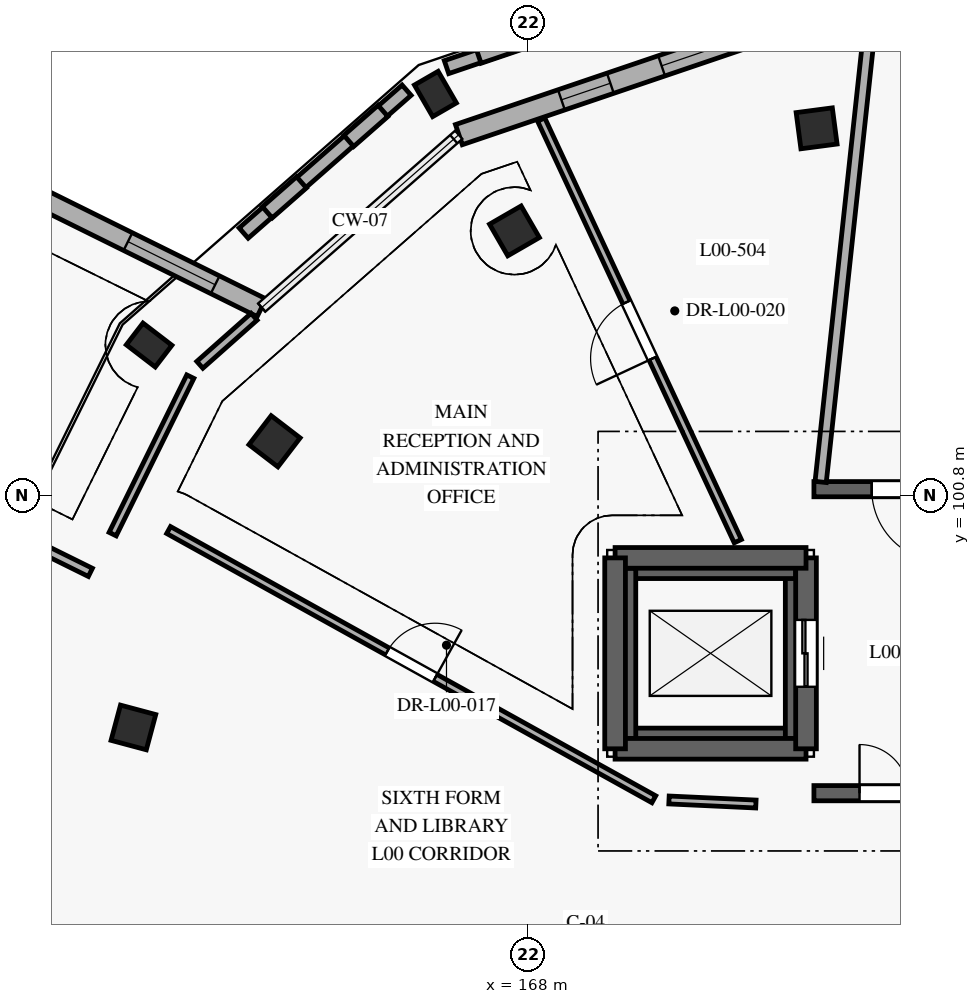
"""IFC4 building model, lengths in metres.
Left out: names, types, materials, properties, quantities, classifications, styles, units other than length and angle.
Written with IfcOpenShell. Run it as: python <this file> out.ifc"""

import sys

from ifc_helpers import new_model, si_unit, direction, frame, frame_2d, origin, origin_2d, place, context, subcontext, project, spatial, rectangle, extrude, element, fill, save


model = new_model("IFC4")
c1 = context("Model", 3, precision=1e-05, world=origin(), true_north=direction((0.0, 1.0)))
c2 = subcontext(c1, "Body", "Model", "MODEL_VIEW")
j1 = project(units=[si_unit("LENGTHUNIT", "METRE"), si_unit("PLANEANGLEUNIT", "RADIAN")], contexts=[c1])
p1 = place(None, origin())
s1 = spatial("IfcSite", under=j1, at=p1, CompositionType="ELEMENT")
p2 = place(p1, origin())
s2 = spatial("IfcBuilding", under=s1, at=p2, CompositionType="ELEMENT")
p3 = place(p2, origin())
s3 = spatial("IfcBuildingStorey", under=s2, at=p3, CompositionType="ELEMENT", Elevation=0.0)
for number, where, z_axis, x_axis in (
    (1, (166.475, 107.4, 0.0), (0.0, 0.0, 1.0), (-0.866, -0.5, 0.0)),
    (2, (161.767, 103.271, 0.0), (0.0, 0.0, 1.0), (-0.609, -0.793, 0.0)),
):
    element("IfcColumn", number, at=place(p3, frame(where, z_axis=z_axis, x_axis=x_axis)), inside=s3, PredefinedType="PILASTER", context=c2, shape_type="SweptSolid", body=[
        extrude(rectangle(XDim=0.45, YDim=0.6, at=origin_2d()), origin(), (0.0, 0.0, 1.0), 4.2),
    ])
for number, where, z_axis, x_axis in (
    (3, (172.744, 106.835, 0.0), (0.0, 0.0, 1.0), (-0.991, -0.131, 0.0)),
    (4, (167.775, 105.148, 0.0), (0.0, 0.0, 1.0), (-0.866, -0.5, 0.0)),
    (5, (163.829, 101.688, 0.0), (0.0, 0.0, 1.0), (-0.609, -0.793, 0.0)),
    (6, (161.508, 96.981, 0.0), (0.0, 0.0, 1.0), (-0.259, -0.966, 0.0)),
):
    element("IfcColumn", number, at=place(p3, frame(where, z_axis=z_axis, x_axis=x_axis)), inside=s3, PredefinedType="COLUMN", context=c2, shape_type="SweptSolid", body=[
        extrude(rectangle(XDim=0.6, YDim=0.6, at=origin_2d()), origin(), (0.0, 0.0, 1.0), 4.2),
    ])
p4 = place(p3, frame((157.696, 106.814, 0.0), z_axis=(0.0, 0.0, 1.0), x_axis=(0.896260258603, -0.443528520897, 0.0)))
e7 = element("IfcWall", 7, at=p4, inside=s3, PredefinedType="SOLIDWALL", context=c2, shape_type="SweptSolid", body=[
    extrude(rectangle(XDim=6.605, YDim=0.325, at=frame_2d((3.303, 0.0))), origin(), (0.0, 0.0, 1.0), 3.94),
])
p5 = place(p4, frame((0.927, 0.0, 0.85)))
e8 = element("IfcOpeningElement", 8, at=p5, cuts=e7, PredefinedType="OPENING", context=c2, shape_type="SweptSolid", body=[
    extrude(rectangle(XDim=1.45, YDim=1.8, at=frame_2d((0.725, 0.9))), frame((0.0, 0.172, 0.0), z_axis=(0.0, -1.0, 0.0), x_axis=(1.0, 0.0, 0.0)), (0.0, 0.0, 1.0), 0.345),
])
p6 = place(p4, frame((4.154, 0.0, 0.85)))
e9 = element("IfcOpeningElement", 9, at=p6, cuts=e7, PredefinedType="OPENING", context=c2, shape_type="SweptSolid", body=[
    extrude(rectangle(XDim=1.6, YDim=1.8, at=frame_2d((0.8, 0.9))), frame((0.0, 0.172, 0.0), z_axis=(0.0, -1.0, 0.0), x_axis=(1.0, 0.0, 0.0)), (0.0, 0.0, 1.0), 0.345),
])
p7 = place(p3, frame((166.861, 106.731, 0.0), z_axis=(0.0, 0.0, 1.0), x_axis=(0.94693663561, 0.321420298269, 0.0)))
e10 = element("IfcWall", 10, at=p7, inside=s3, PredefinedType="SOLIDWALL", context=c2, shape_type="SweptSolid", body=[
    extrude(rectangle(XDim=5.961, YDim=0.35, at=frame_2d((2.98, 0.0))), origin(), (0.0, 0.0, 1.0), 3.94),
])
p8 = place(p7, frame((1.781, 0.0, 0.85)))
e11 = element("IfcOpeningElement", 11, at=p8, cuts=e10, PredefinedType="OPENING", context=c2, shape_type="SweptSolid", body=[
    extrude(rectangle(XDim=0.85, YDim=1.4, at=frame_2d((0.425, 0.7))), frame((0.0, 0.185, 0.0), z_axis=(0.0, -1.0, 0.0), x_axis=(1.0, 0.0, 0.0)), (0.0, 0.0, 1.0), 0.37),
])
p9 = place(p7, frame((3.521, 0.0, 0.85)))
e12 = element("IfcOpeningElement", 12, at=p9, cuts=e10, PredefinedType="OPENING", context=c2, shape_type="SweptSolid", body=[
    extrude(rectangle(XDim=1.9, YDim=1.8, at=frame_2d((0.95, 0.9))), frame((0.0, 0.185, 0.0), z_axis=(0.0, -1.0, 0.0), x_axis=(1.0, 0.0, 0.0)), (0.0, 0.0, 1.0), 0.37),
])
p10 = place(p3, frame((172.506, 108.647, 0.0), z_axis=(0.0, 0.0, 1.0), x_axis=(0.997858658418, -0.065407169492, 0.0)))
e13 = element("IfcWall", 13, at=p10, inside=s3, PredefinedType="SOLIDWALL", context=c2, shape_type="SweptSolid", body=[
    extrude(rectangle(XDim=5.961, YDim=0.38, at=frame_2d((2.98, 0.0))), origin(), (0.0, 0.0, 1.0), 3.94),
])
p11 = place(p10, frame((1.98, 0.0, 0.0)))
e14 = element("IfcOpeningElement", 14, at=p11, cuts=e13, PredefinedType="OPENING", context=c2, shape_type="SweptSolid", body=[
    extrude(rectangle(XDim=2.0, YDim=2.2, at=frame_2d((1.0, 1.1))), frame((0.0, 0.2, 0.0), z_axis=(0.0, -1.0, 0.0), x_axis=(1.0, 0.0, 0.0)), (0.0, 0.0, 1.0), 0.4),
])
p12 = place(p3, frame((171.991, 109.652, 0.0), z_axis=(0.0, 0.0, 1.0), x_axis=(-0.946926405411, -0.321450435893, 0.0)))
e15 = element("IfcWall", 15, at=p12, inside=s3, PredefinedType="ELEMENTEDWALL", context=c2, shape_type="SweptSolid", body=[
    extrude(rectangle(XDim=5.632, YDim=0.225, at=frame_2d((2.816, 0.0))), origin(), (0.0, 0.0, 1.0), 0.55),
])
p13 = place(p3, frame((167.906, 108.265, 0.55), z_axis=(0.0, 0.0, 1.0), x_axis=(-0.946868666253, -0.321620473335, 0.0)))
e16 = element("IfcWall", 16, at=p13, inside=s3, PredefinedType="ELEMENTEDWALL", context=c2, shape_type="SweptSolid", body=[
    extrude(rectangle(XDim=0.76, YDim=0.245, at=frame_2d((0.38, 0.0))), origin(), (0.0, 0.0, 1.0), 3.39),
])
p14 = place(p3, frame((166.001, 107.462, 0.0), z_axis=(0.0, 0.0, 1.0), x_axis=(-0.751829405296, -0.659357676328, 0.0)))
e17 = element("IfcWall", 17, at=p14, inside=s3, PredefinedType="ELEMENTEDWALL", context=c2, shape_type="SweptSolid", body=[
    extrude(rectangle(XDim=3.564, YDim=0.225, at=frame_2d((1.782, 0.0))), origin(), (0.0, 0.0, 1.0), 0.55),
])
p15 = place(p3, frame((165.613, 107.122, 0.55), z_axis=(0.0, 0.0, 1.0), x_axis=(-0.751787503055, -0.659405452093, 0.0)))
e18 = element("IfcWall", 18, at=p15, inside=s3, PredefinedType="ELEMENTEDWALL", context=c2, shape_type="SweptSolid", body=[
    extrude(rectangle(XDim=0.748, YDim=0.245, at=frame_2d((0.374, 0.0))), origin(), (0.0, 0.0, 1.0), 3.39),
])
p16 = place(p3, frame((164.273, 105.946, 0.55), z_axis=(0.0, 0.0, 1.0), x_axis=(-0.751929391285, -0.659243650346, 0.0)))
e19 = element("IfcWall", 19, at=p16, inside=s3, PredefinedType="ELEMENTEDWALL", context=c2, shape_type="SweptSolid", body=[
    extrude(rectangle(XDim=0.748, YDim=0.245, at=frame_2d((0.374, 0.0))), origin(), (0.0, 0.0, 1.0), 3.39),
])
p17 = place(p3, frame((169.6, 96.8, -1.4), z_axis=(0.0, 0.0, 1.0), x_axis=(1.0, 0.0, 0.0)))
e20 = element("IfcWall", 20, at=p17, inside=s3, PredefinedType="SHEAR", context=c2, shape_type="SweptSolid", body=[
    extrude(rectangle(XDim=2.8, YDim=0.34, at=frame_2d((1.4, 0.0))), origin(), (0.0, 0.0, 1.0), 1.4),
])
p18 = place(p3, frame((172.4, 96.8, -1.4), z_axis=(0.0, 0.0, 1.0), x_axis=(0.0, 1.0, 0.0)))
e21 = element("IfcWall", 21, at=p18, inside=s3, PredefinedType="SHEAR", context=c2, shape_type="SweptSolid", body=[
    extrude(rectangle(XDim=2.8, YDim=0.34, at=frame_2d((1.4, 0.0))), origin(), (0.0, 0.0, 1.0), 1.4),
])
p19 = place(p3, frame((172.4, 99.6, -1.4), z_axis=(0.0, 0.0, 1.0), x_axis=(-1.0, 0.0, 0.0)))
e22 = element("IfcWall", 22, at=p19, inside=s3, PredefinedType="SHEAR", context=c2, shape_type="SweptSolid", body=[
    extrude(rectangle(XDim=2.8, YDim=0.34, at=frame_2d((1.4, 0.0))), origin(), (0.0, 0.0, 1.0), 1.4),
])
p20 = place(p3, frame((169.6, 99.6, -1.4), z_axis=(0.0, 0.0, 1.0), x_axis=(0.0, -1.0, 0.0)))
e23 = element("IfcWall", 23, at=p20, inside=s3, PredefinedType="SHEAR", context=c2, shape_type="SweptSolid", body=[
    extrude(rectangle(XDim=2.8, YDim=0.34, at=frame_2d((1.4, 0.0))), origin(), (0.0, 0.0, 1.0), 1.4),
])
p21 = place(p3, frame((169.43, 96.63, 0.0), z_axis=(0.0, 0.0, 1.0), x_axis=(1.0, 0.0, 0.0)))
e24 = element("IfcWall", 24, at=p21, inside=s3, PredefinedType="SHEAR", context=c2, shape_type="SweptSolid", body=[
    extrude(rectangle(XDim=3.14, YDim=0.34, at=frame_2d((1.57, 0.0))), origin(), (0.0, 0.0, 1.0), 3.95),
])
p22 = place(p3, frame((172.57, 96.63, 0.0), z_axis=(0.0, 0.0, 1.0), x_axis=(0.0, 1.0, 0.0)))
e25 = element("IfcWall", 25, at=p22, inside=s3, PredefinedType="SHEAR", context=c2, shape_type="SweptSolid", body=[
    extrude(rectangle(XDim=3.14, YDim=0.34, at=frame_2d((1.57, 0.0))), origin(), (0.0, 0.0, 1.0), 3.95),
])
p23 = place(p22, frame((1.02, 0.0, 0.0)))
e26 = element("IfcOpeningElement", 26, at=p23, cuts=e25, PredefinedType="OPENING", context=c2, shape_type="SweptSolid", body=[
    extrude(rectangle(XDim=1.1, YDim=2.1, at=frame_2d((0.55, 1.05))), frame((0.0, 0.18, 0.0), z_axis=(0.0, -1.0, 0.0), x_axis=(1.0, 0.0, 0.0)), (0.0, 0.0, 1.0), 0.36),
])
for number, where, z_axis, x_axis in (
    (27, (172.57, 99.77, 0.0), (0.0, 0.0, 1.0), (-1.0, 0.0, 0.0)),
    (28, (169.43, 99.77, 0.0), (0.0, 0.0, 1.0), (0.0, -1.0, 0.0)),
):
    element("IfcWall", number, at=place(p3, frame(where, z_axis=z_axis, x_axis=x_axis)), inside=s3, PredefinedType="SHEAR", context=c2, shape_type="SweptSolid", body=[
        extrude(rectangle(XDim=3.14, YDim=0.34, at=frame_2d((1.57, 0.0))), origin(), (0.0, 0.0, 1.0), 3.95),
    ])
p24 = place(p3, frame((172.7, 95.9, 0.0), z_axis=(0.0, 0.0, 1.0), x_axis=(1.0, 0.0, 0.0)))
e29 = element("IfcWall", 29, at=p24, inside=s3, PredefinedType="SHEAR", context=c2, shape_type="SweptSolid", body=[
    extrude(rectangle(XDim=3.1, YDim=0.25, at=frame_2d((1.55, 0.0))), origin(), (0.0, 0.0, 1.0), 3.95),
])
p25 = place(p24, frame((0.75, 0.0, 0.0)))
e30 = element("IfcOpeningElement", 30, at=p25, cuts=e29, PredefinedType="OPENING", context=c2, shape_type="SweptSolid", body=[
    extrude(rectangle(XDim=1.6, YDim=2.15, at=frame_2d((0.8, 1.075))), frame((0.0, 0.135, 0.0), z_axis=(0.0, -1.0, 0.0), x_axis=(1.0, 0.0, 0.0)), (0.0, 0.0, 1.0), 0.27),
])
p26 = place(p3, frame((175.8, 100.9, 0.0), z_axis=(0.0, 0.0, 1.0), x_axis=(-1.0, 0.0, 0.0)))
e31 = element("IfcWall", 31, at=p26, inside=s3, PredefinedType="SHEAR", context=c2, shape_type="SweptSolid", body=[
    extrude(rectangle(XDim=3.1, YDim=0.25, at=frame_2d((1.55, 0.0))), origin(), (0.0, 0.0, 1.0), 3.95),
])
p27 = place(p26, frame((0.95, 0.0, 0.0)))
e32 = element("IfcOpeningElement", 32, at=p27, cuts=e31, PredefinedType="OPENING", context=c2, shape_type="SweptSolid", body=[
    extrude(rectangle(XDim=1.2, YDim=2.1, at=frame_2d((0.6, 1.05))), frame((0.0, 0.135, 0.0), z_axis=(0.0, -1.0, 0.0), x_axis=(1.0, 0.0, 0.0)), (0.0, 0.0, 1.0), 0.27),
])
p28 = place(p3, frame((173.605, 108.386, 0.0), z_axis=(0.0, 0.0, 1.0), x_axis=(-0.107241554815, -0.994232995289, 0.0)))
e33 = element("IfcWall", 33, at=p28, inside=s3, PredefinedType="PARTITIONING", context=c2, shape_type="SweptSolid", body=[
    extrude(rectangle(XDim=7.41, YDim=0.185, at=frame_2d((3.705, 0.0))), origin(), (0.0, 0.0, 1.0), 3.915),
])
p29 = place(p3, frame((171.448, 100.045, 0.0), z_axis=(0.0, 0.0, 1.0), x_axis=(-0.422616424188, 0.906308643899, 0.0)))
e34 = element("IfcWall", 34, at=p29, inside=s3, PredefinedType="PARTITIONING", context=c2, shape_type="SweptSolid", body=[
    extrude(rectangle(XDim=7.651, YDim=0.13, at=frame_2d((3.825, 0.0))), origin(), (0.0, 0.0, 1.0), 3.915),
])
p30 = place(p29, frame((3.315, 0.0, 0.0)))
e35 = element("IfcOpeningElement", 35, at=p30, cuts=e34, PredefinedType="OPENING", context=c2, shape_type="SweptSolid", body=[
    extrude(rectangle(XDim=1.02, YDim=2.06, at=frame_2d((0.51, 1.03))), frame((0.0, 0.075, 0.0), z_axis=(0.0, -1.0, 0.0), x_axis=(1.0, 0.0, 0.0)), (0.0, 0.0, 1.0), 0.15),
])
p31 = place(p3, frame((162.444, 102.751, 0.0), z_axis=(0.0, 0.0, 1.0), x_axis=(-0.442302732692, -0.896865816415, 0.0)))
e36 = element("IfcWall", 36, at=p31, inside=s3, PredefinedType="PARTITIONING", context=c2, shape_type="SweptSolid", body=[
    extrude(rectangle(XDim=2.887, YDim=0.13, at=frame_2d((1.444, 0.0))), origin(), (0.0, 0.0, 1.0), 3.915),
])
p32 = place(p3, frame((162.087, 100.228, 0.0), z_axis=(0.0, 0.0, 1.0), x_axis=(0.874404504476, -0.485197653077, 0.0)))
e37 = element("IfcWall", 37, at=p32, inside=s3, PredefinedType="PARTITIONING", context=c2, shape_type="SweptSolid", body=[
    extrude(rectangle(XDim=9.126, YDim=0.13, at=frame_2d((4.563, 0.0))), origin(), (0.0, 0.0, 1.0), 3.915),
])
p33 = place(p32, frame((4.113, 0.0, 0.0)))
e38 = element("IfcOpeningElement", 38, at=p33, cuts=e37, PredefinedType="OPENING", context=c2, shape_type="SweptSolid", body=[
    extrude(rectangle(XDim=0.9, YDim=2.05, at=frame_2d((0.45, 1.025))), frame((0.0, 0.075, 0.0), z_axis=(0.0, -1.0, 0.0), x_axis=(1.0, 0.0, 0.0)), (0.0, 0.0, 1.0), 0.15),
])
p34 = place(p3, frame((170.316, 95.788, 0.0), z_axis=(0.0, 0.0, 1.0), x_axis=(0.998914369118, -0.046584151481, 0.0)))
e39 = element("IfcWall", 39, at=p34, inside=s3, PredefinedType="PARTITIONING", context=c2, shape_type="SweptSolid", body=[
    extrude(rectangle(XDim=1.431, YDim=0.13, at=frame_2d((0.715, 0.0))), origin(), (0.0, 0.0, 1.0), 3.915),
])
p35 = place(p3, frame((125.87, 116.804, 0.0), z_axis=(0.0, 0.0, 1.0), x_axis=(0.896396995338, -0.443252102926, 0.0)))
e40 = element("IfcWall", 40, at=p35, inside=s3, PredefinedType="PARTITIONING", context=c2, shape_type="SweptSolid", body=[
    extrude(rectangle(XDim=38.968, YDim=0.15, at=frame_2d((19.484, 0.0))), origin(), (0.0, 0.0, 1.0), 3.915),
])
p36 = place(p35, frame((18.964, 0.0, 0.0)))
e41 = element("IfcOpeningElement", 41, at=p36, cuts=e40, PredefinedType="OPENING", context=c2, shape_type="SweptSolid", body=[
    extrude(rectangle(XDim=1.04, YDim=2.1, at=frame_2d((0.52, 1.05))), frame((0.0, 0.085, 0.0), z_axis=(0.0, -1.0, 0.0), x_axis=(1.0, 0.0, 0.0)), (0.0, 0.0, 1.0), 0.17),
])
p37 = place(p3, frame((162.601, 102.945, 0.0), z_axis=(0.0, 0.0, 1.0), x_axis=(0.748323834823, 0.66333357991, 0.0)))
e42 = element("IfcWall", 42, at=p37, inside=s3, PredefinedType="PARTITIONING", context=c2, shape_type="SweptSolid", body=[
    extrude(rectangle(XDim=1.192, YDim=0.15, at=frame_2d((0.596, 0.0))), origin(), (0.0, 0.0, 1.0), 3.915),
])
p38 = place(p6, origin())
e43 = element("IfcWindow", 43, at=p38, inside=s3, PartitioningType="SINGLE_PANEL", PredefinedType="WINDOW", context=c2, shape_type="SweptSolid", body=[
    extrude(rectangle(XDim=1.6, YDim=1.8, at=frame_2d((0.8, 0.9))), frame((0.0, 0.03, 0.0), z_axis=(0.0, -1.0, 0.0), x_axis=(1.0, 0.0, 0.0)), (0.0, 0.0, 1.0), 0.06),
])
fill(e9, e43)
p39 = place(p8, origin())
e44 = element("IfcWindow", 44, at=p39, inside=s3, PartitioningType="SINGLE_PANEL", PredefinedType="WINDOW", context=c2, shape_type="SweptSolid", body=[
    extrude(rectangle(XDim=0.85, YDim=1.4, at=frame_2d((0.425, 0.7))), frame((0.0, 0.03, 0.0), z_axis=(0.0, -1.0, 0.0), x_axis=(1.0, 0.0, 0.0)), (0.0, 0.0, 1.0), 0.06),
])
fill(e11, e44)
p40 = place(p9, origin())
e45 = element("IfcWindow", 45, at=p40, inside=s3, PartitioningType="SINGLE_PANEL", PredefinedType="WINDOW", context=c2, shape_type="SweptSolid", body=[
    extrude(rectangle(XDim=1.9, YDim=1.8, at=frame_2d((0.95, 0.9))), frame((0.0, 0.03, 0.0), z_axis=(0.0, -1.0, 0.0), x_axis=(1.0, 0.0, 0.0)), (0.0, 0.0, 1.0), 0.06),
])
fill(e12, e45)
p41 = place(p23, frame((1.1, 0.0, 0.0), z_axis=(0.0, 0.0, 1.0), x_axis=(-1.0, 0.0, 0.0)))
e46 = element("IfcDoor", 46, at=p41, inside=s3, OperationType="DOUBLE_DOOR_SLIDING", PredefinedType="DOOR", context=c2, shape_type="SweptSolid", body=[
    extrude(rectangle(XDim=1.1, YDim=2.1, at=frame_2d((0.55, 1.05))), frame((0.0, 0.025, 0.0), z_axis=(0.0, -1.0, 0.0), x_axis=(1.0, 0.0, 0.0)), (0.0, 0.0, 1.0), 0.05),
])
fill(e26, e46)
p42 = place(p25, frame((1.6, 0.0, 0.0), z_axis=(0.0, 0.0, 1.0), x_axis=(-1.0, 0.0, 0.0)))
e47 = element("IfcDoor", 47, at=p42, inside=s3, OperationType="DOUBLE_DOOR_SINGLE_SWING", PredefinedType="DOOR", context=c2, shape_type="SweptSolid", body=[
    extrude(rectangle(XDim=1.6, YDim=2.15, at=frame_2d((0.8, 1.075))), frame((0.0, 0.025, 0.0), z_axis=(0.0, -1.0, 0.0), x_axis=(1.0, 0.0, 0.0)), (0.0, 0.0, 1.0), 0.05),
])
fill(e30, e47)
p43 = place(p27, frame((1.2, 0.0, 0.0), z_axis=(0.0, 0.0, 1.0), x_axis=(-1.0, 0.0, 0.0)))
e48 = element("IfcDoor", 48, at=p43, inside=s3, OperationType="SINGLE_SWING_LEFT", PredefinedType="DOOR", context=c2, shape_type="SweptSolid", body=[
    extrude(rectangle(XDim=1.2, YDim=2.1, at=frame_2d((0.6, 1.05))), frame((0.0, 0.025, 0.0), z_axis=(0.0, -1.0, 0.0), x_axis=(1.0, 0.0, 0.0)), (0.0, 0.0, 1.0), 0.05),
])
fill(e32, e48)
p44 = place(p33, origin())
e49 = element("IfcDoor", 49, at=p44, inside=s3, OperationType="SINGLE_SWING_RIGHT", PredefinedType="DOOR", context=c2, shape_type="SweptSolid", body=[
    extrude(rectangle(XDim=0.9, YDim=2.05, at=frame_2d((0.45, 1.025))), frame((0.0, 0.025, 0.0), z_axis=(0.0, -1.0, 0.0), x_axis=(1.0, 0.0, 0.0)), (0.0, 0.0, 1.0), 0.05),
])
fill(e38, e49)
p45 = place(p30, origin())
e50 = element("IfcDoor", 50, at=p45, inside=s3, OperationType="SINGLE_SWING_LEFT", PredefinedType="DOOR", context=c2, shape_type="SweptSolid", body=[
    extrude(rectangle(XDim=1.02, YDim=2.06, at=frame_2d((0.51, 1.03))), frame((0.0, 0.025, 0.0), z_axis=(0.0, -1.0, 0.0), x_axis=(1.0, 0.0, 0.0)), (0.0, 0.0, 1.0), 0.05),
])
fill(e35, e50)
save(model, sys.argv[1])
